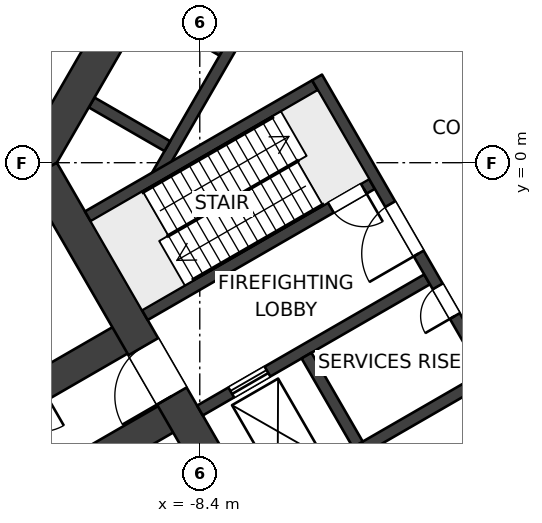
"""IFC4 building model, lengths in metres.
Left out: names, types, materials, properties, quantities, classifications, styles, units other than length and angle.
Written with IfcOpenShell. Run it as: python <this file> out.ifc"""

import sys

from ifc_helpers import new_model, si_unit, direction, frame, frame_2d, origin, place, context, subcontext, project, spatial, polyline, rectangle, outline, extrude, element, fill, save


model = new_model("IFC4")
c1 = context("Model", 3, precision=1e-05, world=origin(), true_north=direction((0.0, 1.0)))
c2 = subcontext(c1, "Body", "Model", "MODEL_VIEW")
j1 = project(units=[si_unit("LENGTHUNIT", "METRE"), si_unit("PLANEANGLEUNIT", "RADIAN")], contexts=[c1])
p1 = place(None, origin())
s1 = spatial("IfcSite", under=j1, at=p1, CompositionType="ELEMENT")
p2 = place(p1, origin())
s2 = spatial("IfcBuilding", under=s1, at=p2, CompositionType="ELEMENT")
p3 = place(p2, frame((0.0, 0.0, 11.0)))
s3 = spatial("IfcBuildingStorey", under=s2, at=p3, CompositionType="ELEMENT", Elevation=11.0)
p4 = place(p3, frame((-6.47, -10.757, 0.0), z_axis=(0.0, 0.0, 1.0), x_axis=(-0.499997612506, 0.8660267822, 0.0)))
e1 = element("IfcWall", 1, at=p4, inside=s3, PredefinedType="SHEAR", context=c2, shape_type="SweptSolid", body=[
    extrude(rectangle(XDim=12.161, YDim=0.9, at=frame_2d((6.08, 0.0))), origin(), (0.0, 0.0, 1.0), 5.0),
])
p5 = place(p4, frame((5.33, 0.0, 0.0)))
e2 = element("IfcOpeningElement", 2, at=p5, cuts=e1, PredefinedType="OPENING", context=c2, shape_type="SweptSolid", body=[
    extrude(rectangle(XDim=1.5, YDim=2.1, at=frame_2d((0.75, 1.05))), frame((0.0, 0.46, 0.0), z_axis=(0.0, -1.0, 0.0), x_axis=(1.0, 0.0, 0.0)), (0.0, 0.0, 1.0), 0.92),
])
p6 = place(p3, origin())
e3 = element("IfcWall", 3, at=p6, inside=s3, PredefinedType="SHEAR", context=c2, shape_type="SweptSolid", body=[
    extrude(outline(polyline([(-6.6, 11.432), (-13.2, 0.0), (-12.94, -0.45), (-12.161, 0.0), (-6.08, 10.531), (-6.08, 11.432), (-6.6, 11.432)])), origin(), (0.0, 0.0, 1.0), 5.0),
])
p7 = place(p3, frame((-0.714, -5.724, 0.0), z_axis=(0.0, 0.0, 1.0), x_axis=(-0.499995050369, 0.866028261437, 0.0)))
e4 = element("IfcWall", 4, at=p7, inside=s3, PredefinedType="SHEAR", context=c2, shape_type="SweptSolid", body=[
    extrude(rectangle(XDim=9.2, YDim=0.3, at=frame_2d((4.6, 0.0))), origin(), (0.0, 0.0, 1.0), 5.0),
])
p8 = place(p7, frame((3.85, 0.0, 0.0)))
e5 = element("IfcOpeningElement", 5, at=p8, cuts=e4, PredefinedType="OPENING", context=c2, shape_type="SweptSolid", body=[
    extrude(rectangle(XDim=1.5, YDim=2.1, at=frame_2d((0.75, 1.05))), frame((0.0, 0.16, 0.0), z_axis=(0.0, -1.0, 0.0), x_axis=(1.0, 0.0, 0.0)), (0.0, 0.0, 1.0), 0.32),
])
p9 = place(p7, frame((1.95, 0.0, 0.0)))
e6 = element("IfcOpeningElement", 6, at=p9, cuts=e4, PredefinedType="OPENING", context=c2, shape_type="SweptSolid", body=[
    extrude(rectangle(XDim=0.9, YDim=2.1, at=frame_2d((0.45, 1.05))), frame((0.0, 0.16, 0.0), z_axis=(0.0, -1.0, 0.0), x_axis=(1.0, 0.0, 0.0)), (0.0, 0.0, 1.0), 0.32),
])
p10 = place(p3, frame((-3.869, -0.559, 0.0), z_axis=(0.0, 0.0, 1.0), x_axis=(-0.86602711848, -0.499997030048, 0.0)))
e7 = element("IfcWall", 7, at=p10, inside=s3, PredefinedType="SHEAR", context=c2, shape_type="SweptSolid", body=[
    extrude(rectangle(XDim=6.901, YDim=0.3, at=frame_2d((3.451, 0.0))), origin(), (0.0, 0.0, 1.0), 5.0),
])
p11 = place(p10, frame((0.25, 0.0, 0.0)))
e8 = element("IfcOpeningElement", 8, at=p11, cuts=e7, PredefinedType="OPENING", context=c2, shape_type="SweptSolid", body=[
    extrude(rectangle(XDim=1.0, YDim=2.1, at=frame_2d((0.5, 1.05))), frame((0.0, 0.16, 0.0), z_axis=(0.0, -1.0, 0.0), x_axis=(1.0, 0.0, 0.0)), (0.0, 0.0, 1.0), 0.32),
])
p12 = place(p3, frame((-5.369, 2.039, 0.0), z_axis=(0.0, 0.0, 1.0), x_axis=(-0.86602711848, -0.499997030048, 0.0)))
e9 = element("IfcWall", 9, at=p12, inside=s3, PredefinedType="SHEAR", context=c2, shape_type="SweptSolid", body=[
    extrude(rectangle(XDim=6.901, YDim=0.3, at=frame_2d((3.451, 0.0))), origin(), (0.0, 0.0, 1.0), 5.0),
])
p13 = place(p3, frame((-2.419, -3.071, 0.0), z_axis=(0.0, 0.0, 1.0), x_axis=(-0.86602711848, -0.499997030048, 0.0)))
e10 = element("IfcWall", 10, at=p13, inside=s3, PredefinedType="SHEAR", context=c2, shape_type="SweptSolid", body=[
    extrude(rectangle(XDim=6.901, YDim=0.3, at=frame_2d((3.451, 0.0))), origin(), (0.0, 0.0, 1.0), 5.0),
])
p14 = place(p13, frame((4.85, 0.0, 0.0)))
e11 = element("IfcOpeningElement", 11, at=p14, cuts=e10, PredefinedType="OPENING", context=c2, shape_type="SweptSolid", body=[
    extrude(rectangle(XDim=1.1, YDim=2.1, at=frame_2d((0.55, 1.05))), frame((0.0, 0.16, 0.0), z_axis=(0.0, -1.0, 0.0), x_axis=(1.0, 0.0, 0.0)), (0.0, 0.0, 1.0), 0.32),
])
p15 = place(p3, frame((-0.919, -5.669, 0.0), z_axis=(0.0, 0.0, 1.0), x_axis=(-0.866011800373, -0.500023561059, 0.0)))
e12 = element("IfcWall", 12, at=p15, inside=s3, PredefinedType="SHEAR", context=c2, shape_type="SweptSolid", body=[
    extrude(rectangle(XDim=6.902, YDim=0.3, at=frame_2d((3.451, 0.0))), origin(), (0.0, 0.0, 1.0), 5.0),
])
p16 = place(p3, frame((-4.241, -7.414, 0.0), z_axis=(0.0, 0.0, 1.0), x_axis=(-0.500048589285, 0.86599734893, 0.0)))
e13 = element("IfcWall", 13, at=p16, inside=s3, PredefinedType="SHEAR", context=c2, shape_type="SweptSolid", body=[
    extrude(rectangle(XDim=2.7, YDim=0.3, at=frame_2d((1.35, 0.0))), origin(), (0.0, 0.0, 1.0), 5.0),
])
p17 = place(p3, frame((-9.548, -0.374, 0.0), z_axis=(0.0, 0.0, 1.0), x_axis=(0.500002290144, 0.866024081565, 0.0)))
e14 = element("IfcWall", 14, at=p17, inside=s3, PredefinedType="SHEAR", context=c2, shape_type="SweptSolid", body=[
    extrude(rectangle(XDim=10.195, YDim=0.3, at=frame_2d((5.098, 0.0))), origin(), (0.0, 0.0, 1.0), 5.0),
])
p18 = place(p3, frame((-9.254, 0.435, 0.0), z_axis=(0.0, 0.0, 1.0), x_axis=(-0.866007057882, 0.500031774688, 0.0)))
e15 = element("IfcWall", 15, at=p18, inside=s3, PredefinedType="SHEAR", context=c2, shape_type="SweptSolid", body=[
    extrude(rectangle(XDim=2.3, YDim=0.3, at=frame_2d((1.15, 0.0))), origin(), (0.0, 0.0, 1.0), 5.0),
])
p19 = place(p3, frame((-7.829, 2.903, 0.0), z_axis=(0.0, 0.0, 1.0), x_axis=(-0.866053019151, 0.499952165731, 0.0)))
e16 = element("IfcWall", 16, at=p19, inside=s3, PredefinedType="SHEAR", context=c2, shape_type="SweptSolid", body=[
    extrude(rectangle(XDim=2.3, YDim=0.2, at=frame_2d((1.15, 0.0))), origin(), (0.0, 0.0, 1.0), 5.0),
])
p20 = place(p3, frame((-8.91, -6.53, 0.0), z_axis=(0.0, 0.0, 1.0), x_axis=(-0.866024404313, -0.500001731131, 0.0)))
e17 = element("IfcWall", 17, at=p20, inside=s3, PredefinedType="SHEAR", context=c2, shape_type="SweptSolid", body=[
    extrude(rectangle(XDim=36.953, YDim=0.8, at=frame_2d((18.477, 0.0))), origin(), (0.0, 0.0, 1.0), 5.0),
])
p21 = place(p20, frame((2.75, 0.0, 0.0)))
e18 = element("IfcOpeningElement", 18, at=p21, cuts=e17, PredefinedType="OPENING", context=c2, shape_type="SweptSolid", body=[
    extrude(rectangle(XDim=1.2, YDim=2.1, at=frame_2d((0.6, 1.05))), frame((0.0, 0.41, 0.0), z_axis=(0.0, -1.0, 0.0), x_axis=(1.0, 0.0, 0.0)), (0.0, 0.0, 1.0), 0.82),
])
p22 = place(p20, frame((7.35, 0.0, 0.0)))
e19 = element("IfcOpeningElement", 19, at=p22, cuts=e17, PredefinedType="OPENING", context=c2, shape_type="SweptSolid", body=[
    extrude(rectangle(XDim=1.2, YDim=2.1, at=frame_2d((0.6, 1.05))), frame((0.0, 0.41, 0.0), z_axis=(0.0, -1.0, 0.0), x_axis=(1.0, 0.0, 0.0)), (0.0, 0.0, 1.0), 0.82),
])
p23 = place(p3, frame((-10.11, -4.451, 0.0), z_axis=(0.0, 0.0, 1.0), x_axis=(-0.866025284237, -0.500000207062, 0.0)))
e20 = element("IfcWall", 20, at=p23, inside=s3, PredefinedType="SHEAR", context=c2, shape_type="SweptSolid", body=[
    extrude(rectangle(XDim=36.75, YDim=0.8, at=frame_2d((18.375, 0.0))), origin(), (0.0, 0.0, 1.0), 5.0),
])
p24 = place(p23, frame((10.0, 0.0, 0.0)))
e21 = element("IfcOpeningElement", 21, at=p24, cuts=e20, PredefinedType="OPENING", context=c2, shape_type="SweptSolid", body=[
    extrude(rectangle(XDim=1.0, YDim=2.1, at=frame_2d((0.5, 1.05))), frame((0.0, 0.41, 0.0), z_axis=(0.0, -1.0, 0.0), x_axis=(1.0, 0.0, 0.0)), (0.0, 0.0, 1.0), 0.82),
])
p25 = place(p23, frame((2.85, 0.0, 0.0)))
e22 = element("IfcOpeningElement", 22, at=p25, cuts=e20, PredefinedType="OPENING", context=c2, shape_type="SweptSolid", body=[
    extrude(rectangle(XDim=1.2, YDim=2.1, at=frame_2d((0.6, 1.05))), frame((0.0, 0.41, 0.0), z_axis=(0.0, -1.0, 0.0), x_axis=(1.0, 0.0, 0.0)), (0.0, 0.0, 1.0), 0.82),
])
p26 = place(p3, frame((-9.45, 6.495, 0.0), z_axis=(0.0, 0.0, 1.0), x_axis=(-0.866025301493, -0.500000177174, 0.0)))
e23 = element("IfcWall", 23, at=p26, inside=s3, PredefinedType="SOLIDWALL", context=c2, shape_type="SweptSolid", body=[
    extrude(rectangle(XDim=43.095, YDim=0.3, at=frame_2d((21.548, 0.0))), origin(), (0.0, 0.0, 1.0), 4.7),
])
p27 = place(p26, frame((26.595, 0.0, 0.0)))
e24 = element("IfcOpeningElement", 24, at=p27, cuts=e23, PredefinedType="OPENING", context=c2, shape_type="SweptSolid", body=[
    extrude(rectangle(XDim=1.8, YDim=2.4, at=frame_2d((0.9, 1.2))), frame((0.0, 0.16, 0.0), z_axis=(0.0, -1.0, 0.0), x_axis=(1.0, 0.0, 0.0)), (0.0, 0.0, 1.0), 0.32),
])
p28 = place(p14, origin())
e25 = element("IfcDoor", 25, at=p28, inside=s3, OperationType="DOUBLE_DOOR_SLIDING", PredefinedType="DOOR", context=c2, shape_type="SweptSolid", body=[
    extrude(rectangle(XDim=1.1, YDim=2.1, at=frame_2d((0.55, 1.05))), frame((0.0, 0.025, 0.0), z_axis=(0.0, -1.0, 0.0), x_axis=(1.0, 0.0, 0.0)), (0.0, 0.0, 1.0), 0.05),
])
fill(e11, e25)
p29 = place(p8, origin())
e26 = element("IfcDoor", 26, at=p29, inside=s3, OperationType="DOUBLE_DOOR_DOUBLE_SWING", PredefinedType="DOOR", context=c2, shape_type="SweptSolid", body=[
    extrude(rectangle(XDim=1.5, YDim=2.1, at=frame_2d((0.75, 1.05))), frame((0.0, 0.025, 0.0), z_axis=(0.0, -1.0, 0.0), x_axis=(1.0, 0.0, 0.0)), (0.0, 0.0, 1.0), 0.05),
])
fill(e5, e26)
p30 = place(p9, origin())
e27 = element("IfcDoor", 27, at=p30, inside=s3, OperationType="SINGLE_SWING_LEFT", PredefinedType="DOOR", context=c2, shape_type="SweptSolid", body=[
    extrude(rectangle(XDim=0.9, YDim=2.1, at=frame_2d((0.45, 1.05))), frame((0.0, 0.025, 0.0), z_axis=(0.0, -1.0, 0.0), x_axis=(1.0, 0.0, 0.0)), (0.0, 0.0, 1.0), 0.05),
])
fill(e6, e27)
p31 = place(p11, origin())
e28 = element("IfcDoor", 28, at=p31, inside=s3, OperationType="SINGLE_SWING_LEFT", PredefinedType="DOOR", context=c2, shape_type="SweptSolid", body=[
    extrude(rectangle(XDim=1.0, YDim=2.1, at=frame_2d((0.5, 1.05))), frame((0.0, 0.025, 0.0), z_axis=(0.0, -1.0, 0.0), x_axis=(1.0, 0.0, 0.0)), (0.0, 0.0, 1.0), 0.05),
])
fill(e8, e28)
p32 = place(p5, origin())
e29 = element("IfcDoor", 29, at=p32, inside=s3, OperationType="DOUBLE_DOOR_DOUBLE_SWING", PredefinedType="DOOR", context=c2, shape_type="SweptSolid", body=[
    extrude(rectangle(XDim=1.5, YDim=2.1, at=frame_2d((0.75, 1.05))), frame((0.0, 0.025, 0.0), z_axis=(0.0, -1.0, 0.0), x_axis=(1.0, 0.0, 0.0)), (0.0, 0.0, 1.0), 0.05),
])
fill(e2, e29)
save(model, sys.argv[1])
